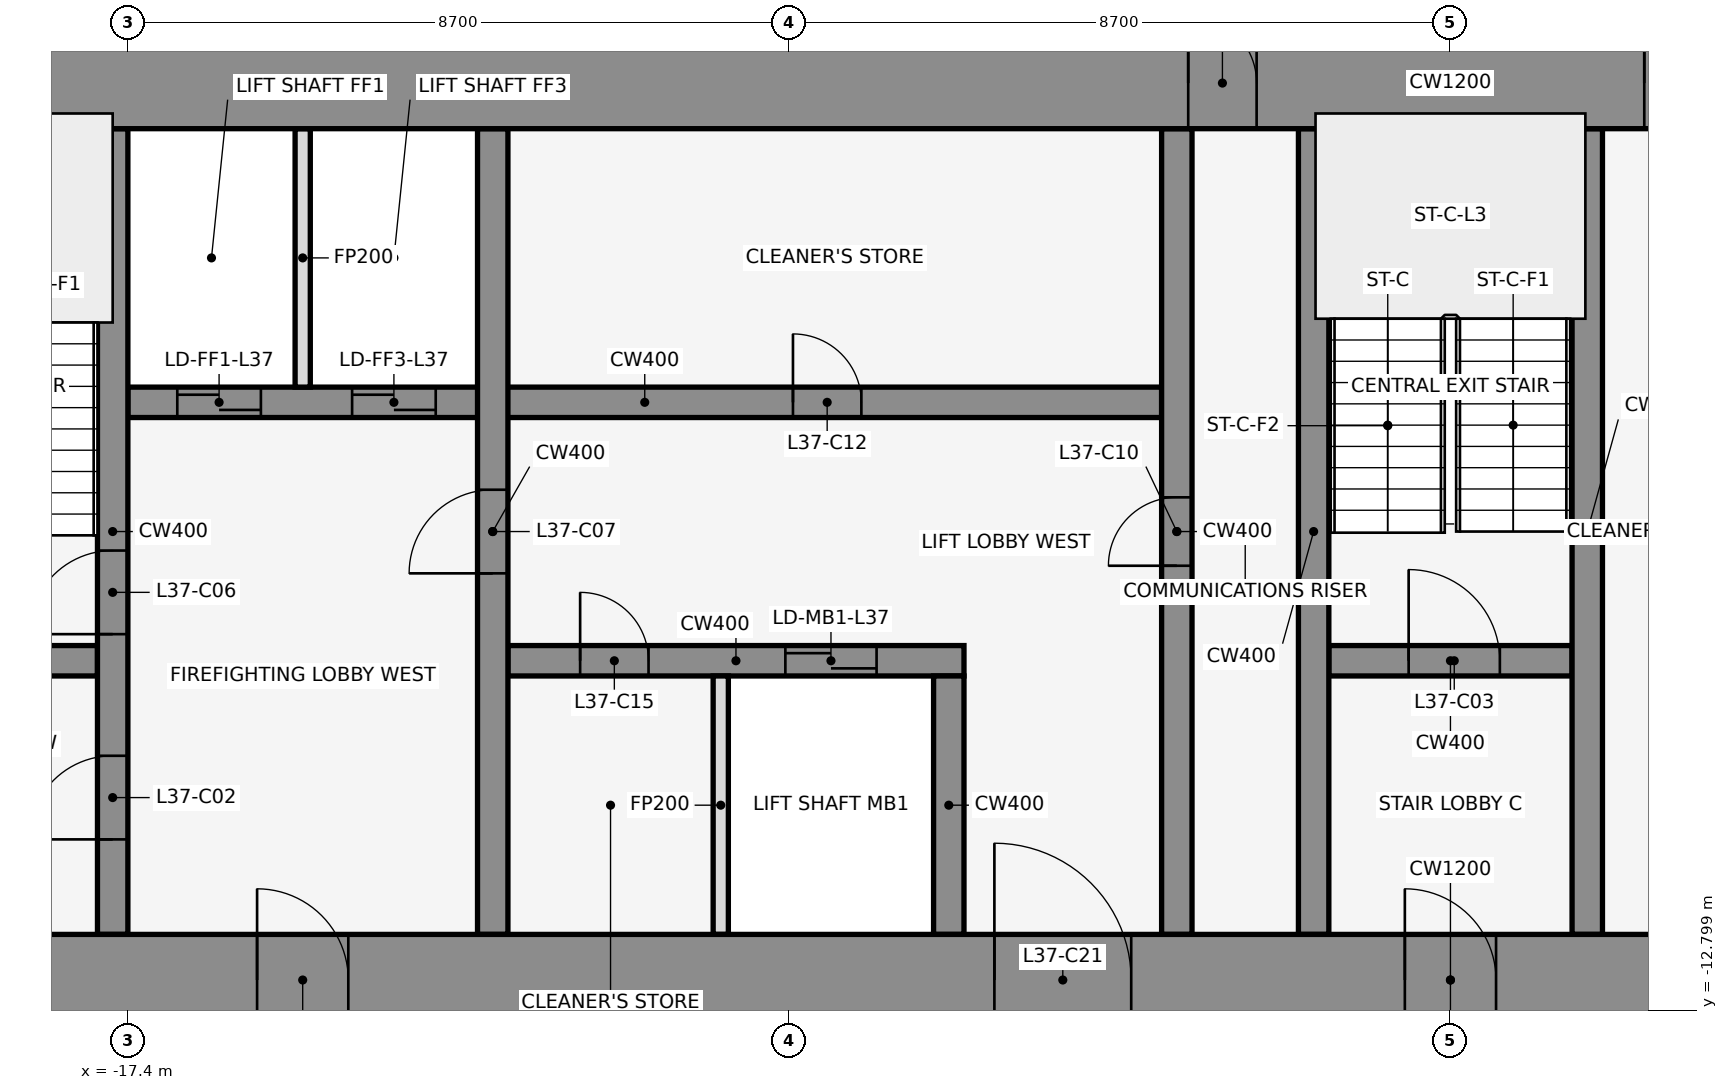
"""IFC4 building model, lengths in metres.
Left out: names, types, materials, properties, quantities, classifications, styles, units other than length and angle.
Written with IfcOpenShell. Run it as: python <this file> out.ifc"""

import sys

from ifc_helpers import new_model, si_unit, direction, frame, frame_2d, origin, place, context, subcontext, project, spatial, rectangle, extrude, element, fill, save


model = new_model("IFC4")
c1 = context("Model", 3, precision=1e-05, world=origin(), true_north=direction((0.0, 1.0)))
c2 = subcontext(c1, "Body", "Model", "MODEL_VIEW")
j1 = project(units=[si_unit("LENGTHUNIT", "METRE"), si_unit("PLANEANGLEUNIT", "RADIAN")], contexts=[c1])
p1 = place(None, origin())
s1 = spatial("IfcSite", under=j1, at=p1, CompositionType="ELEMENT")
p2 = place(p1, origin())
s2 = spatial("IfcBuilding", under=s1, at=p2, CompositionType="ELEMENT")
p3 = place(p2, frame((0.0, 0.0, 169.1)))
s3 = spatial("IfcBuildingStorey", under=s2, at=p3, CompositionType="ELEMENT", Elevation=169.1)
for number, where, z_axis, x_axis in (
    (1, (1.901, 1.08, 0.0), (0.0, 0.0, 1.0), (-0.84, -0.543, 0.0)),
    (2, (-0.068, -0.105, 0.0), (0.0, 0.0, 1.0), (-0.84, 0.543, 0.0)),
    (3, (-14.599, 1.08, 0.0), (0.0, 0.0, 1.0), (-0.84, -0.543, 0.0)),
):
    element("IfcWall", number, at=place(p3, frame(where, z_axis=z_axis, x_axis=x_axis)), inside=s3, PredefinedType="STANDARD", context=c2, shape_type="SweptSolid", body=[
        extrude(rectangle(XDim=2.183, YDim=0.25, at=frame_2d((1.091, 0.0))), origin(), (0.0, 0.0, 1.0), 3.95),
    ])
p4 = place(p3, frame((-20.8, -8.2, 0.0), z_axis=(0.0, 0.0, 1.0), x_axis=(1.0, 0.0, 0.0)))
e4 = element("IfcWall", 4, at=p4, inside=s3, PredefinedType="SHEAR", context=c2, shape_type="SweptSolid", body=[
    extrude(rectangle(XDim=3.0, YDim=0.4, at=frame_2d((1.5, 0.0))), origin(), (0.0, 0.0, 1.0), 4.1),
])
p5 = place(p4, frame((0.85, 0.0, 0.0)))
e5 = element("IfcOpeningElement", 5, at=p5, cuts=e4, PredefinedType="OPENING", context=c2, shape_type="SweptSolid", body=[
    extrude(rectangle(XDim=1.2, YDim=2.1, at=frame_2d((0.6, 1.05))), frame((0.0, 0.212, 0.0), z_axis=(0.0, -1.0, 0.0), x_axis=(1.0, 0.0, 0.0)), (0.0, 0.0, 1.0), 0.424),
])
p6 = place(p3, frame((-12.4, -8.2, 0.0), z_axis=(0.0, 0.0, 1.0), x_axis=(1.0, 0.0, 0.0)))
e6 = element("IfcWall", 6, at=p6, inside=s3, PredefinedType="SHEAR", context=c2, shape_type="SweptSolid", body=[
    extrude(rectangle(XDim=6.0, YDim=0.4, at=frame_2d((3.0, 0.0))), origin(), (0.0, 0.0, 1.0), 4.1),
])
p7 = place(p6, frame((3.65, 0.0, 0.0)))
e7 = element("IfcOpeningElement", 7, at=p7, cuts=e6, PredefinedType="OPENING", context=c2, shape_type="SweptSolid", body=[
    extrude(rectangle(XDim=1.2, YDim=2.1, at=frame_2d((0.6, 1.05))), frame((0.0, 0.212, 0.0), z_axis=(0.0, -1.0, 0.0), x_axis=(1.0, 0.0, 0.0)), (0.0, 0.0, 1.0), 0.424),
])
p8 = place(p6, frame((0.95, 0.0, 0.0)))
e8 = element("IfcOpeningElement", 8, at=p8, cuts=e6, PredefinedType="OPENING", context=c2, shape_type="SweptSolid", body=[
    extrude(rectangle(XDim=0.9, YDim=2.1, at=frame_2d((0.45, 1.05))), frame((0.0, 0.212, 0.0), z_axis=(0.0, -1.0, 0.0), x_axis=(1.0, 0.0, 0.0)), (0.0, 0.0, 1.0), 0.424),
])
p9 = place(p3, frame((-1.6, -8.2, 0.0), z_axis=(0.0, 0.0, 1.0), x_axis=(1.0, 0.0, 0.0)))
e9 = element("IfcWall", 9, at=p9, inside=s3, PredefinedType="SHEAR", context=c2, shape_type="SweptSolid", body=[
    extrude(rectangle(XDim=3.2, YDim=0.4, at=frame_2d((1.6, 0.0))), origin(), (0.0, 0.0, 1.0), 4.1),
])
p10 = place(p9, frame((1.05, 0.0, 0.0)))
e10 = element("IfcOpeningElement", 10, at=p10, cuts=e9, PredefinedType="OPENING", context=c2, shape_type="SweptSolid", body=[
    extrude(rectangle(XDim=1.2, YDim=2.1, at=frame_2d((0.6, 1.05))), frame((0.0, 0.212, 0.0), z_axis=(0.0, -1.0, 0.0), x_axis=(1.0, 0.0, 0.0)), (0.0, 0.0, 1.0), 0.424),
])
p11 = place(p3, frame((-17.4, -4.8, 0.0), z_axis=(0.0, 0.0, 1.0), x_axis=(1.0, 0.0, 0.0)))
e11 = element("IfcWall", 11, at=p11, inside=s3, PredefinedType="SHEAR", context=c2, shape_type="SweptSolid", body=[
    extrude(rectangle(XDim=13.6, YDim=0.4, at=frame_2d((6.8, 0.0))), origin(), (0.0, 0.0, 1.0), 4.1),
])
p12 = place(p11, frame((0.65, 0.0, 0.0)))
e12 = element("IfcOpeningElement", 12, at=p12, cuts=e11, PredefinedType="OPENING", context=c2, shape_type="SweptSolid", body=[
    extrude(rectangle(XDim=1.1, YDim=2.1, at=frame_2d((0.55, 1.05))), frame((0.0, 0.212, 0.0), z_axis=(0.0, -1.0, 0.0), x_axis=(1.0, 0.0, 0.0)), (0.0, 0.0, 1.0), 0.424),
])
p13 = place(p11, frame((2.95, 0.0, 0.0)))
e13 = element("IfcOpeningElement", 13, at=p13, cuts=e11, PredefinedType="OPENING", context=c2, shape_type="SweptSolid", body=[
    extrude(rectangle(XDim=1.1, YDim=2.1, at=frame_2d((0.55, 1.05))), frame((0.0, 0.212, 0.0), z_axis=(0.0, -1.0, 0.0), x_axis=(1.0, 0.0, 0.0)), (0.0, 0.0, 1.0), 0.424),
])
p14 = place(p11, frame((8.75, 0.0, 0.0)))
e14 = element("IfcOpeningElement", 14, at=p14, cuts=e11, PredefinedType="OPENING", context=c2, shape_type="SweptSolid", body=[
    extrude(rectangle(XDim=0.9, YDim=2.1, at=frame_2d((0.45, 1.05))), frame((0.0, 0.212, 0.0), z_axis=(0.0, -1.0, 0.0), x_axis=(1.0, 0.0, 0.0)), (0.0, 0.0, 1.0), 0.424),
])
p15 = place(p3, frame((-17.6, -11.8, 0.0), z_axis=(0.0, 0.0, 1.0), x_axis=(0.0, 1.0, 0.0)))
e15 = element("IfcWall", 15, at=p15, inside=s3, PredefinedType="SHEAR", context=c2, shape_type="SweptSolid", body=[
    extrude(rectangle(XDim=10.6, YDim=0.4, at=frame_2d((5.3, 0.0))), origin(), (0.0, 0.0, 1.0), 4.1),
])
p16 = place(p15, frame((1.25, 0.0, 0.0)))
e16 = element("IfcOpeningElement", 16, at=p16, cuts=e15, PredefinedType="OPENING", context=c2, shape_type="SweptSolid", body=[
    extrude(rectangle(XDim=1.1, YDim=2.1, at=frame_2d((0.55, 1.05))), frame((0.0, 0.212, 0.0), z_axis=(0.0, -1.0, 0.0), x_axis=(1.0, 0.0, 0.0)), (0.0, 0.0, 1.0), 0.424),
])
p17 = place(p15, frame((3.95, 0.0, 0.0)))
e17 = element("IfcOpeningElement", 17, at=p17, cuts=e15, PredefinedType="OPENING", context=c2, shape_type="SweptSolid", body=[
    extrude(rectangle(XDim=1.1, YDim=2.1, at=frame_2d((0.55, 1.05))), frame((0.0, 0.212, 0.0), z_axis=(0.0, -1.0, 0.0), x_axis=(1.0, 0.0, 0.0)), (0.0, 0.0, 1.0), 0.424),
])
p18 = place(p3, frame((-15.1, -4.6, 0.0), z_axis=(0.0, 0.0, 1.0), x_axis=(0.0, 1.0, 0.0)))
e18 = element("IfcWall", 18, at=p18, inside=s3, PredefinedType="PARTITIONING", context=c2, shape_type="SweptSolid", body=[
    extrude(rectangle(XDim=3.4, YDim=0.2, at=frame_2d((1.7, 0.0))), origin(), (0.0, 0.0, 1.0), 2.84),
])
p19 = place(p3, frame((-12.6, -11.8, 0.0), z_axis=(0.0, 0.0, 1.0), x_axis=(0.0, 1.0, 0.0)))
e19 = element("IfcWall", 19, at=p19, inside=s3, PredefinedType="SHEAR", context=c2, shape_type="SweptSolid", body=[
    extrude(rectangle(XDim=10.6, YDim=0.4, at=frame_2d((5.3, 0.0))), origin(), (0.0, 0.0, 1.0), 4.1),
])
p20 = place(p19, frame((4.75, 0.0, 0.0)))
e20 = element("IfcOpeningElement", 20, at=p20, cuts=e19, PredefinedType="OPENING", context=c2, shape_type="SweptSolid", body=[
    extrude(rectangle(XDim=1.1, YDim=2.1, at=frame_2d((0.55, 1.05))), frame((0.0, 0.212, 0.0), z_axis=(0.0, -1.0, 0.0), x_axis=(1.0, 0.0, 0.0)), (0.0, 0.0, 1.0), 0.424),
])
p21 = place(p3, frame((-9.6, -11.8, 0.0), z_axis=(0.0, 0.0, 1.0), x_axis=(0.0, 1.0, 0.0)))
e21 = element("IfcWall", 21, at=p21, inside=s3, PredefinedType="PARTITIONING", context=c2, shape_type="SweptSolid", body=[
    extrude(rectangle(XDim=3.4, YDim=0.2, at=frame_2d((1.7, 0.0))), origin(), (0.0, 0.0, 1.0), 2.84),
])
p22 = place(p3, frame((-6.6, -11.8, 0.0), z_axis=(0.0, 0.0, 1.0), x_axis=(0.0, 1.0, 0.0)))
e22 = element("IfcWall", 22, at=p22, inside=s3, PredefinedType="SHEAR", context=c2, shape_type="SweptSolid", body=[
    extrude(rectangle(XDim=3.4, YDim=0.4, at=frame_2d((1.7, 0.0))), origin(), (0.0, 0.0, 1.0), 4.1),
])
p23 = place(p3, frame((-3.6, -11.8, 0.0), z_axis=(0.0, 0.0, 1.0), x_axis=(0.0, 1.0, 0.0)))
e23 = element("IfcWall", 23, at=p23, inside=s3, PredefinedType="SHEAR", context=c2, shape_type="SweptSolid", body=[
    extrude(rectangle(XDim=10.6, YDim=0.4, at=frame_2d((5.3, 0.0))), origin(), (0.0, 0.0, 1.0), 4.1),
])
p24 = place(p23, frame((4.85, 0.0, 0.0)))
e24 = element("IfcOpeningElement", 24, at=p24, cuts=e23, PredefinedType="OPENING", context=c2, shape_type="SweptSolid", body=[
    extrude(rectangle(XDim=0.9, YDim=2.1, at=frame_2d((0.45, 1.05))), frame((0.0, 0.212, 0.0), z_axis=(0.0, -1.0, 0.0), x_axis=(1.0, 0.0, 0.0)), (0.0, 0.0, 1.0), 0.424),
])
for number, where, z_axis, x_axis in (
    (25, (-1.8, -11.8, 0.0), (0.0, 0.0, 1.0), (0.0, 1.0, 0.0)),
    (26, (1.8, -11.8, 0.0), (0.0, 0.0, 1.0), (0.0, 1.0, 0.0)),
):
    element("IfcWall", number, at=place(p3, frame(where, z_axis=z_axis, x_axis=x_axis)), inside=s3, PredefinedType="SHEAR", context=c2, shape_type="SweptSolid", body=[
        extrude(rectangle(XDim=10.6, YDim=0.4, at=frame_2d((5.3, 0.0))), origin(), (0.0, 0.0, 1.0), 4.1),
    ])
p25 = place(p3, frame((-22.0, -0.6, 0.0), z_axis=(0.0, 0.0, 1.0), x_axis=(1.0, 0.0, 0.0)))
e27 = element("IfcWall", 27, at=p25, inside=s3, PredefinedType="SHEAR", context=c2, shape_type="SweptSolid", body=[
    extrude(rectangle(XDim=44.0, YDim=1.2, at=frame_2d((22.0, 0.0))), origin(), (0.0, 0.0, 1.0), 4.1),
])
p26 = place(p25, frame((18.55, 0.0, 0.0)))
e28 = element("IfcOpeningElement", 28, at=p26, cuts=e27, PredefinedType="OPENING", context=c2, shape_type="SweptSolid", body=[
    extrude(rectangle(XDim=0.9, YDim=2.1, at=frame_2d((0.45, 1.05))), frame((0.0, 0.612, 0.0), z_axis=(0.0, -1.0, 0.0), x_axis=(1.0, 0.0, 0.0)), (0.0, 0.0, 1.0), 1.224),
])
p27 = place(p25, frame((24.55, 0.0, 0.0)))
e29 = element("IfcOpeningElement", 29, at=p27, cuts=e27, PredefinedType="OPENING", context=c2, shape_type="SweptSolid", body=[
    extrude(rectangle(XDim=0.9, YDim=2.1, at=frame_2d((0.45, 1.05))), frame((0.0, 0.612, 0.0), z_axis=(0.0, -1.0, 0.0), x_axis=(1.0, 0.0, 0.0)), (0.0, 0.0, 1.0), 1.224),
])
p28 = place(p3, frame((-22.0, -12.4, 0.0), z_axis=(0.0, 0.0, 1.0), x_axis=(1.0, 0.0, 0.0)))
e30 = element("IfcWall", 30, at=p28, inside=s3, PredefinedType="SHEAR", context=c2, shape_type="SweptSolid", body=[
    extrude(rectangle(XDim=44.0, YDim=1.2, at=frame_2d((22.0, 0.0))), origin(), (0.0, 0.0, 1.0), 4.1),
])
p29 = place(p28, frame((2.2, 0.0, 0.0)))
e31 = element("IfcOpeningElement", 31, at=p29, cuts=e30, PredefinedType="OPENING", context=c2, shape_type="SweptSolid", body=[
    extrude(rectangle(XDim=1.2, YDim=2.1, at=frame_2d((0.6, 1.05))), frame((0.0, 0.612, 0.0), z_axis=(0.0, -1.0, 0.0), x_axis=(1.0, 0.0, 0.0)), (0.0, 0.0, 1.0), 1.224),
])
p30 = place(p28, frame((21.4, 0.0, 0.0)))
e32 = element("IfcOpeningElement", 32, at=p30, cuts=e30, PredefinedType="OPENING", context=c2, shape_type="SweptSolid", body=[
    extrude(rectangle(XDim=1.2, YDim=2.1, at=frame_2d((0.6, 1.05))), frame((0.0, 0.612, 0.0), z_axis=(0.0, -1.0, 0.0), x_axis=(1.0, 0.0, 0.0)), (0.0, 0.0, 1.0), 1.224),
])
p31 = place(p28, frame((40.6, 0.0, 0.0)))
e33 = element("IfcOpeningElement", 33, at=p31, cuts=e30, PredefinedType="OPENING", context=c2, shape_type="SweptSolid", body=[
    extrude(rectangle(XDim=1.2, YDim=2.1, at=frame_2d((0.6, 1.05))), frame((0.0, 0.612, 0.0), z_axis=(0.0, -1.0, 0.0), x_axis=(1.0, 0.0, 0.0)), (0.0, 0.0, 1.0), 1.224),
])
p32 = place(p28, frame((16.0, 0.0, 0.0)))
e34 = element("IfcOpeningElement", 34, at=p32, cuts=e30, PredefinedType="OPENING", context=c2, shape_type="SweptSolid", body=[
    extrude(rectangle(XDim=1.8, YDim=2.1, at=frame_2d((0.9, 1.05))), frame((0.0, 0.612, 0.0), z_axis=(0.0, -1.0, 0.0), x_axis=(1.0, 0.0, 0.0)), (0.0, 0.0, 1.0), 1.224),
])
p33 = place(p28, frame((6.3, 0.0, 0.0)))
e35 = element("IfcOpeningElement", 35, at=p33, cuts=e30, PredefinedType="OPENING", context=c2, shape_type="SweptSolid", body=[
    extrude(rectangle(XDim=1.2, YDim=2.1, at=frame_2d((0.6, 1.05))), frame((0.0, 0.612, 0.0), z_axis=(0.0, -1.0, 0.0), x_axis=(1.0, 0.0, 0.0)), (0.0, 0.0, 1.0), 1.224),
])
p34 = place(p28, frame((26.2, 0.0, 0.0)))
e36 = element("IfcOpeningElement", 36, at=p34, cuts=e30, PredefinedType="OPENING", context=c2, shape_type="SweptSolid", body=[
    extrude(rectangle(XDim=1.8, YDim=2.1, at=frame_2d((0.9, 1.05))), frame((0.0, 0.612, 0.0), z_axis=(0.0, -1.0, 0.0), x_axis=(1.0, 0.0, 0.0)), (0.0, 0.0, 1.0), 1.224),
])
p35 = place(p28, frame((36.5, 0.0, 0.0)))
e37 = element("IfcOpeningElement", 37, at=p35, cuts=e30, PredefinedType="OPENING", context=c2, shape_type="SweptSolid", body=[
    extrude(rectangle(XDim=1.2, YDim=2.1, at=frame_2d((0.6, 1.05))), frame((0.0, 0.612, 0.0), z_axis=(0.0, -1.0, 0.0), x_axis=(1.0, 0.0, 0.0)), (0.0, 0.0, 1.0), 1.224),
])
p36 = place(p16, frame((1.1, 0.0, 0.0), z_axis=(0.0, 0.0, 1.0), x_axis=(-1.0, 0.0, 0.0)))
e38 = element("IfcDoor", 38, at=p36, inside=s3, OperationType="SINGLE_SWING_LEFT", PredefinedType="DOOR", context=c2, shape_type="SweptSolid", body=[
    extrude(rectangle(XDim=1.1, YDim=2.1, at=frame_2d((0.55, 1.05))), frame((0.0, 0.025, 0.0), z_axis=(0.0, -1.0, 0.0), x_axis=(1.0, 0.0, 0.0)), (0.0, 0.0, 1.0), 0.05),
])
fill(e16, e38)
p37 = place(p10, origin())
e39 = element("IfcDoor", 39, at=p37, inside=s3, OperationType="SINGLE_SWING_LEFT", PredefinedType="DOOR", context=c2, shape_type="SweptSolid", body=[
    extrude(rectangle(XDim=1.2, YDim=2.1, at=frame_2d((0.6, 1.05))), frame((0.0, 0.025, 0.0), z_axis=(0.0, -1.0, 0.0), x_axis=(1.0, 0.0, 0.0)), (0.0, 0.0, 1.0), 0.05),
])
fill(e10, e39)
p38 = place(p12, origin())
e40 = element("IfcDoor", 40, at=p38, inside=s3, OperationType="DOUBLE_DOOR_SLIDING", PredefinedType="DOOR", context=c2, shape_type="SweptSolid", body=[
    extrude(rectangle(XDim=1.1, YDim=2.1, at=frame_2d((0.55, 1.05))), frame((0.0, 0.025, 0.0), z_axis=(0.0, -1.0, 0.0), x_axis=(1.0, 0.0, 0.0)), (0.0, 0.0, 1.0), 0.05),
])
fill(e12, e40)
p39 = place(p13, origin())
e41 = element("IfcDoor", 41, at=p39, inside=s3, OperationType="DOUBLE_DOOR_SLIDING", PredefinedType="DOOR", context=c2, shape_type="SweptSolid", body=[
    extrude(rectangle(XDim=1.1, YDim=2.1, at=frame_2d((0.55, 1.05))), frame((0.0, 0.025, 0.0), z_axis=(0.0, -1.0, 0.0), x_axis=(1.0, 0.0, 0.0)), (0.0, 0.0, 1.0), 0.05),
])
fill(e13, e41)
p40 = place(p7, origin())
e42 = element("IfcDoor", 42, at=p40, inside=s3, OperationType="DOUBLE_DOOR_SLIDING", PredefinedType="DOOR", context=c2, shape_type="SweptSolid", body=[
    extrude(rectangle(XDim=1.2, YDim=2.1, at=frame_2d((0.6, 1.05))), frame((0.0, 0.025, 0.0), z_axis=(0.0, -1.0, 0.0), x_axis=(1.0, 0.0, 0.0)), (0.0, 0.0, 1.0), 0.05),
])
fill(e7, e42)
p41 = place(p17, frame((1.1, 0.0, 0.0), z_axis=(0.0, 0.0, 1.0), x_axis=(-1.0, 0.0, 0.0)))
e43 = element("IfcDoor", 43, at=p41, inside=s3, OperationType="SINGLE_SWING_LEFT", PredefinedType="DOOR", context=c2, shape_type="SweptSolid", body=[
    extrude(rectangle(XDim=1.1, YDim=2.1, at=frame_2d((0.55, 1.05))), frame((0.0, 0.025, 0.0), z_axis=(0.0, -1.0, 0.0), x_axis=(1.0, 0.0, 0.0)), (0.0, 0.0, 1.0), 0.05),
])
fill(e17, e43)
p42 = place(p20, origin())
e44 = element("IfcDoor", 44, at=p42, inside=s3, OperationType="SINGLE_SWING_LEFT", PredefinedType="DOOR", context=c2, shape_type="SweptSolid", body=[
    extrude(rectangle(XDim=1.1, YDim=2.1, at=frame_2d((0.55, 1.05))), frame((0.0, 0.025, 0.0), z_axis=(0.0, -1.0, 0.0), x_axis=(1.0, 0.0, 0.0)), (0.0, 0.0, 1.0), 0.05),
])
fill(e20, e44)
p43 = place(p24, frame((0.9, 0.0, 0.0), z_axis=(0.0, 0.0, 1.0), x_axis=(-1.0, 0.0, 0.0)))
e45 = element("IfcDoor", 45, at=p43, inside=s3, OperationType="SINGLE_SWING_LEFT", PredefinedType="DOOR", context=c2, shape_type="SweptSolid", body=[
    extrude(rectangle(XDim=0.9, YDim=2.1, at=frame_2d((0.45, 1.05))), frame((0.0, 0.025, 0.0), z_axis=(0.0, -1.0, 0.0), x_axis=(1.0, 0.0, 0.0)), (0.0, 0.0, 1.0), 0.05),
])
fill(e24, e45)
p44 = place(p14, origin())
e46 = element("IfcDoor", 46, at=p44, inside=s3, OperationType="SINGLE_SWING_RIGHT", PredefinedType="DOOR", context=c2, shape_type="SweptSolid", body=[
    extrude(rectangle(XDim=0.9, YDim=2.1, at=frame_2d((0.45, 1.05))), frame((0.0, 0.025, 0.0), z_axis=(0.0, -1.0, 0.0), x_axis=(1.0, 0.0, 0.0)), (0.0, 0.0, 1.0), 0.05),
])
fill(e14, e46)
p45 = place(p8, frame((0.9, 0.0, 0.0), z_axis=(0.0, 0.0, 1.0), x_axis=(-1.0, 0.0, 0.0)))
e47 = element("IfcDoor", 47, at=p45, inside=s3, OperationType="SINGLE_SWING_RIGHT", PredefinedType="DOOR", context=c2, shape_type="SweptSolid", body=[
    extrude(rectangle(XDim=0.9, YDim=2.1, at=frame_2d((0.45, 1.05))), frame((0.0, 0.025, 0.0), z_axis=(0.0, -1.0, 0.0), x_axis=(1.0, 0.0, 0.0)), (0.0, 0.0, 1.0), 0.05),
])
fill(e8, e47)
p46 = place(p26, origin())
e48 = element("IfcDoor", 48, at=p46, inside=s3, OperationType="SINGLE_SWING_LEFT", PredefinedType="DOOR", context=c2, shape_type="SweptSolid", body=[
    extrude(rectangle(XDim=0.9, YDim=2.1, at=frame_2d((0.45, 1.05))), frame((0.0, 0.025, 0.0), z_axis=(0.0, -1.0, 0.0), x_axis=(1.0, 0.0, 0.0)), (0.0, 0.0, 1.0), 0.05),
])
fill(e28, e48)
p47 = place(p27, origin())
e49 = element("IfcDoor", 49, at=p47, inside=s3, OperationType="SINGLE_SWING_LEFT", PredefinedType="DOOR", context=c2, shape_type="SweptSolid", body=[
    extrude(rectangle(XDim=0.9, YDim=2.1, at=frame_2d((0.45, 1.05))), frame((0.0, 0.025, 0.0), z_axis=(0.0, -1.0, 0.0), x_axis=(1.0, 0.0, 0.0)), (0.0, 0.0, 1.0), 0.05),
])
fill(e29, e49)
p48 = place(p30, frame((1.2, 0.0, 0.0), z_axis=(0.0, 0.0, 1.0), x_axis=(-1.0, 0.0, 0.0)))
e50 = element("IfcDoor", 50, at=p48, inside=s3, OperationType="SINGLE_SWING_RIGHT", PredefinedType="DOOR", context=c2, shape_type="SweptSolid", body=[
    extrude(rectangle(XDim=1.2, YDim=2.1, at=frame_2d((0.6, 1.05))), frame((0.0, 0.025, 0.0), z_axis=(0.0, -1.0, 0.0), x_axis=(1.0, 0.0, 0.0)), (0.0, 0.0, 1.0), 0.05),
])
fill(e32, e50)
p49 = place(p32, origin())
e51 = element("IfcDoor", 51, at=p49, inside=s3, OperationType="SINGLE_SWING_LEFT", PredefinedType="DOOR", context=c2, shape_type="SweptSolid", body=[
    extrude(rectangle(XDim=1.8, YDim=2.1, at=frame_2d((0.9, 1.05))), frame((0.0, 0.025, 0.0), z_axis=(0.0, -1.0, 0.0), x_axis=(1.0, 0.0, 0.0)), (0.0, 0.0, 1.0), 0.05),
])
fill(e34, e51)
p50 = place(p33, frame((1.2, 0.0, 0.0), z_axis=(0.0, 0.0, 1.0), x_axis=(-1.0, 0.0, 0.0)))
e52 = element("IfcDoor", 52, at=p50, inside=s3, OperationType="SINGLE_SWING_RIGHT", PredefinedType="DOOR", context=c2, shape_type="SweptSolid", body=[
    extrude(rectangle(XDim=1.2, YDim=2.1, at=frame_2d((0.6, 1.05))), frame((0.0, 0.025, 0.0), z_axis=(0.0, -1.0, 0.0), x_axis=(1.0, 0.0, 0.0)), (0.0, 0.0, 1.0), 0.05),
])
fill(e35, e52)
save(model, sys.argv[1])
